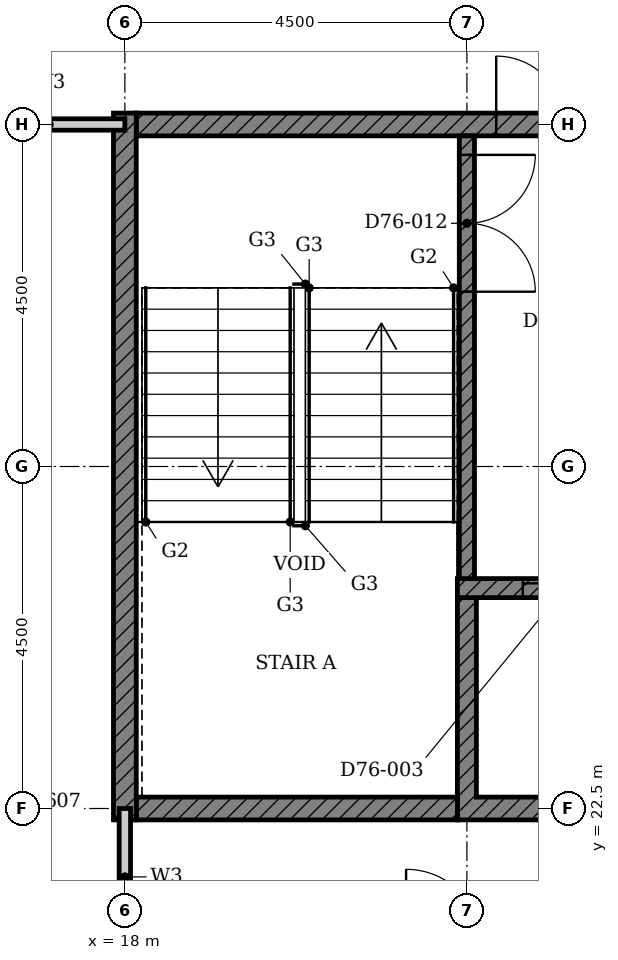
"""IFC4 building model, lengths in metres.
Left out: names, types, materials, properties, quantities, classifications, styles, units other than length and angle.
Written with IfcOpenShell. Run it as: python <this file> out.ifc"""

import sys

from ifc_helpers import new_model, si_unit, direction, frame, frame_2d, origin, place, context, subcontext, project, spatial, polyline, rectangle, outline, extrude, element, fill, save


model = new_model("IFC4")
c1 = context("Model", 3, precision=1e-05, world=origin(), true_north=direction((0.0, 1.0)))
c2 = subcontext(c1, "Body", "Model", "MODEL_VIEW")
j1 = project(units=[si_unit("LENGTHUNIT", "METRE"), si_unit("PLANEANGLEUNIT", "RADIAN")], contexts=[c1])
p1 = place(None, origin())
s1 = spatial("IfcSite", under=j1, at=p1, CompositionType="ELEMENT")
p2 = place(p1, origin())
s2 = spatial("IfcBuilding", under=s1, at=p2, CompositionType="ELEMENT")
p3 = place(p2, frame((0.0, 0.0, 298.2)))
s3 = spatial("IfcBuildingStorey", under=s2, at=p3, CompositionType="ELEMENT", Elevation=298.2)
p4 = place(p3, origin())
e1 = element("IfcWall", 1, at=p4, inside=s3, PredefinedType="SHEAR", context=c2, shape_type="SweptSolid", body=[
    extrude(outline(polyline([(22.375, 22.35), (25.197, 22.35), (25.197, 25.275), (24.947, 25.275), (24.947, 22.65), (22.625, 22.65), (22.625, 25.275), (22.375, 25.275), (22.375, 22.35)])), origin(), (0.0, 0.0, 1.0), 3.4),
])
p5 = place(p3, frame((18.15, 22.5, 0.0), z_axis=(0.0, 0.0, 1.0), x_axis=(1.0, 0.0, 0.0)))
e2 = element("IfcWall", 2, at=p5, inside=s3, PredefinedType="SHEAR", context=c2, shape_type="SweptSolid", body=[
    extrude(rectangle(XDim=4.225, YDim=0.3, at=frame_2d((2.113, 0.0))), origin(), (0.0, 0.0, 1.0), 3.4),
])
p6 = place(p3, frame((18.15, 31.5, 0.0), z_axis=(0.0, 0.0, 1.0), x_axis=(1.0, 0.0, 0.0)))
e3 = element("IfcWall", 3, at=p6, inside=s3, PredefinedType="SHEAR", context=c2, shape_type="SweptSolid", body=[
    extrude(rectangle(XDim=9.368, YDim=0.3, at=frame_2d((4.684, 0.0))), origin(), (0.0, 0.0, 1.0), 3.4),
])
p7 = place(p6, frame((4.736, 0.0, 0.0)))
e4 = element("IfcOpeningElement", 4, at=p7, cuts=e3, PredefinedType="OPENING", context=c2, shape_type="SweptSolid", body=[
    extrude(rectangle(XDim=1.8, YDim=2.1, at=frame_2d((0.9, 1.05))), frame((0.0, 0.16, 0.0), z_axis=(0.0, -1.0, 0.0), x_axis=(1.0, 0.0, 0.0)), (0.0, 0.0, 1.0), 0.32),
])
p8 = place(p3, frame((18.0, 22.35, 0.0), z_axis=(0.0, 0.0, 1.0), x_axis=(0.0, 1.0, 0.0)))
e5 = element("IfcWall", 5, at=p8, inside=s3, PredefinedType="SHEAR", context=c2, shape_type="SweptSolid", body=[
    extrude(rectangle(XDim=9.3, YDim=0.3, at=frame_2d((4.65, 0.0))), origin(), (0.0, 0.0, 1.0), 3.4),
])
p9 = place(p3, frame((22.375, 25.4, 0.0), z_axis=(0.0, 0.0, 1.0), x_axis=(1.0, 0.0, 0.0)))
e6 = element("IfcWall", 6, at=p9, inside=s3, PredefinedType="SHEAR", context=c2, shape_type="SweptSolid", body=[
    extrude(rectangle(XDim=15.678, YDim=0.25, at=frame_2d((7.839, 0.0))), origin(), (0.0, 0.0, 1.0), 3.4),
])
p10 = place(p9, frame((6.004, 0.0, 0.0)))
e7 = element("IfcOpeningElement", 7, at=p10, cuts=e6, PredefinedType="OPENING", context=c2, shape_type="SweptSolid", body=[
    extrude(rectangle(XDim=1.1, YDim=2.1, at=frame_2d((0.55, 1.05))), frame((0.0, 0.135, 0.0), z_axis=(0.0, -1.0, 0.0), x_axis=(1.0, 0.0, 0.0)), (0.0, 0.0, 1.0), 0.27),
])
p11 = place(p9, frame((0.861, 0.0, 0.0)))
e8 = element("IfcOpeningElement", 8, at=p11, cuts=e6, PredefinedType="OPENING", context=c2, shape_type="SweptSolid", body=[
    extrude(rectangle(XDim=1.1, YDim=2.1, at=frame_2d((0.55, 1.05))), frame((0.0, 0.135, 0.0), z_axis=(0.0, -1.0, 0.0), x_axis=(1.0, 0.0, 0.0)), (0.0, 0.0, 1.0), 0.27),
])
p12 = place(p9, frame((3.532, 0.0, 0.0)))
e9 = element("IfcOpeningElement", 9, at=p12, cuts=e6, PredefinedType="OPENING", context=c2, shape_type="SweptSolid", body=[
    extrude(rectangle(XDim=0.9, YDim=2.1, at=frame_2d((0.45, 1.05))), frame((0.0, 0.135, 0.0), z_axis=(0.0, -1.0, 0.0), x_axis=(1.0, 0.0, 0.0)), (0.0, 0.0, 1.0), 0.27),
])
p13 = place(p9, frame((9.961, 0.0, 0.0)))
e10 = element("IfcOpeningElement", 10, at=p13, cuts=e6, PredefinedType="OPENING", context=c2, shape_type="SweptSolid", body=[
    extrude(rectangle(XDim=0.9, YDim=2.1, at=frame_2d((0.45, 1.05))), frame((0.0, 0.135, 0.0), z_axis=(0.0, -1.0, 0.0), x_axis=(1.0, 0.0, 0.0)), (0.0, 0.0, 1.0), 0.27),
])
p14 = place(p9, frame((13.818, 0.0, 0.0)))
e11 = element("IfcOpeningElement", 11, at=p14, cuts=e6, PredefinedType="OPENING", context=c2, shape_type="SweptSolid", body=[
    extrude(rectangle(XDim=0.9, YDim=2.1, at=frame_2d((0.45, 1.05))), frame((0.0, 0.135, 0.0), z_axis=(0.0, -1.0, 0.0), x_axis=(1.0, 0.0, 0.0)), (0.0, 0.0, 1.0), 0.27),
])
p15 = place(p3, frame((22.5, 31.35, 0.0), z_axis=(0.0, 0.0, 1.0), x_axis=(0.0, -1.0, 0.0)))
e12 = element("IfcWall", 12, at=p15, inside=s3, PredefinedType="SHEAR", context=c2, shape_type="SweptSolid", body=[
    extrude(rectangle(XDim=5.825, YDim=0.2, at=frame_2d((2.913, 0.0))), origin(), (0.0, 0.0, 1.0), 3.4),
])
p16 = place(p15, frame((0.25, 0.0, 0.0)))
e13 = element("IfcOpeningElement", 13, at=p16, cuts=e12, PredefinedType="OPENING", context=c2, shape_type="SweptSolid", body=[
    extrude(rectangle(XDim=1.8, YDim=2.1, at=frame_2d((0.9, 1.05))), frame((0.0, 0.11, 0.0), z_axis=(0.0, -1.0, 0.0), x_axis=(1.0, 0.0, 0.0)), (0.0, 0.0, 1.0), 0.22),
])
p17 = place(p3, frame((13.26, 31.5, 0.0), z_axis=(0.0, 0.0, 1.0), x_axis=(1.0, 0.0, 0.0)))
e14 = element("IfcWall", 14, at=p17, inside=s3, PredefinedType="PARTITIONING", context=c2, shape_type="SweptSolid", body=[
    extrude(rectangle(XDim=4.74, YDim=0.15, at=frame_2d((2.37, 0.0))), origin(), (0.0, 0.0, 1.0), 3.4),
])
p18 = place(p17, frame((1.75, 0.0, 0.0)))
e15 = element("IfcOpeningElement", 15, at=p18, cuts=e14, PredefinedType="OPENING", context=c2, shape_type="SweptSolid", body=[
    extrude(rectangle(XDim=1.0, YDim=2.2, at=frame_2d((0.5, 1.1))), frame((0.0, 0.085, 0.0), z_axis=(0.0, -1.0, 0.0), x_axis=(1.0, 0.0, 0.0)), (0.0, 0.0, 1.0), 0.17),
])
p19 = place(p3, frame((18.0, 20.7, 0.0), z_axis=(0.0, 0.0, 1.0), x_axis=(0.0, 1.0, 0.0)))
e16 = element("IfcWall", 16, at=p19, inside=s3, PredefinedType="PARTITIONING", context=c2, shape_type="SweptSolid", body=[
    extrude(rectangle(XDim=1.8, YDim=0.15, at=frame_2d((0.9, 0.0))), origin(), (0.0, 0.0, 1.0), 3.4),
])
p20 = place(p11, origin())
e17 = element("IfcDoor", 17, at=p20, inside=s3, OperationType="DOUBLE_DOOR_SLIDING", PredefinedType="DOOR", context=c2, shape_type="SweptSolid", body=[
    extrude(rectangle(XDim=1.1, YDim=2.1, at=frame_2d((0.55, 1.05))), frame((0.0, 0.025, 0.0), z_axis=(0.0, -1.0, 0.0), x_axis=(1.0, 0.0, 0.0)), (0.0, 0.0, 1.0), 0.05),
])
fill(e8, e17)
p21 = place(p16, origin())
e18 = element("IfcDoor", 18, at=p21, inside=s3, OperationType="DOUBLE_DOOR_SINGLE_SWING", PredefinedType="DOOR", context=c2, shape_type="SweptSolid", body=[
    extrude(rectangle(XDim=1.8, YDim=2.1, at=frame_2d((0.9, 1.05))), frame((0.0, 0.025, 0.0), z_axis=(0.0, -1.0, 0.0), x_axis=(1.0, 0.0, 0.0)), (0.0, 0.0, 1.0), 0.05),
])
fill(e13, e18)
p22 = place(p7, origin())
e19 = element("IfcDoor", 19, at=p22, inside=s3, OperationType="DOUBLE_DOOR_SINGLE_SWING", PredefinedType="DOOR", context=c2, shape_type="SweptSolid", body=[
    extrude(rectangle(XDim=1.8, YDim=2.1, at=frame_2d((0.9, 1.05))), frame((0.0, 0.025, 0.0), z_axis=(0.0, -1.0, 0.0), x_axis=(1.0, 0.0, 0.0)), (0.0, 0.0, 1.0), 0.05),
])
fill(e4, e19)
save(model, sys.argv[1])
